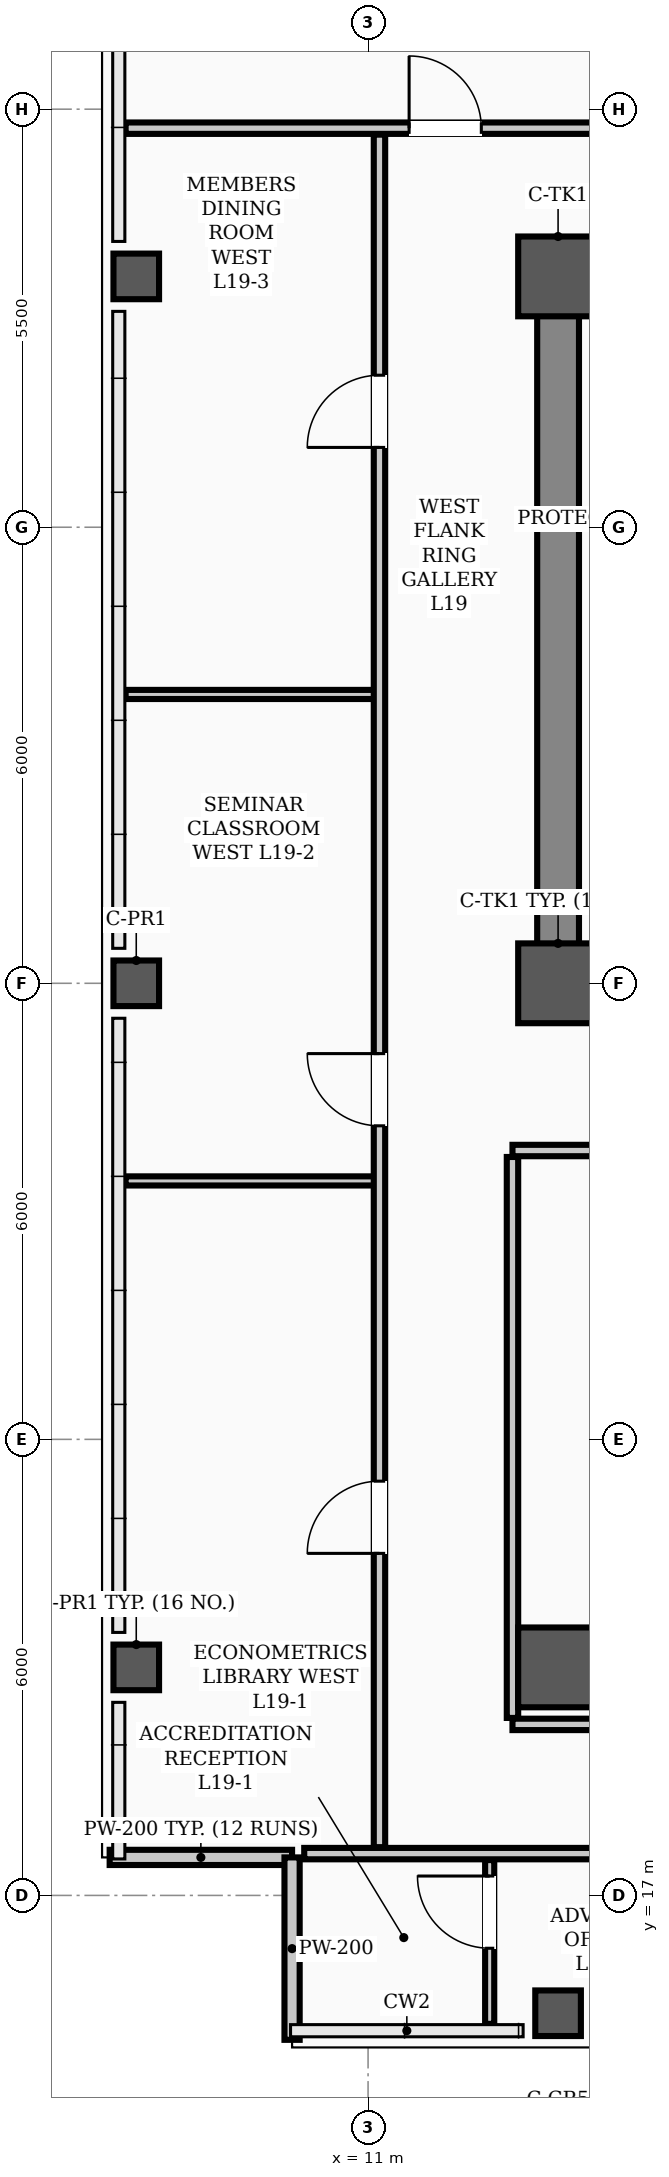
"""IFC4 building model, lengths in metres.
Left out: names, types, materials, properties, quantities, classifications, styles, units other than length and angle.
Written with IfcOpenShell. Run it as: python <this file> out.ifc"""

import sys

from ifc_helpers import new_model, si_unit, direction, frame, frame_2d, origin, origin_2d, place, context, subcontext, project, spatial, rectangle, hollow_rectangle, extrude, element, fill, save


model = new_model("IFC4")
c1 = context("Model", 3, precision=1e-05, world=origin(), true_north=direction((0.0, 1.0)))
c2 = subcontext(c1, "Body", "Model", "MODEL_VIEW")
j1 = project(units=[si_unit("LENGTHUNIT", "METRE"), si_unit("PLANEANGLEUNIT", "RADIAN")], contexts=[c1])
p1 = place(None, origin())
s1 = spatial("IfcSite", under=j1, at=p1, CompositionType="ELEMENT")
p2 = place(p1, origin())
s2 = spatial("IfcBuilding", under=s1, at=p2, CompositionType="ELEMENT")
p3 = place(p2, frame((0.0, 0.0, 77.2)))
s3 = spatial("IfcBuildingStorey", under=s2, at=p3, CompositionType="ELEMENT", Elevation=77.2)
for number, where, z_axis, x_axis in (
    (1, (13.5, 29.0, 0.0), (0.0, 0.0, 1.0), (1.0, 0.0, 0.0)),
    (2, (13.5, 38.3, 0.0), (0.0, 0.0, 1.0), (1.0, 0.0, 0.0)),
    (3, (13.5, 20.0, 0.0), (0.0, 0.0, 1.0), (1.0, 0.0, 0.0)),
):
    element("IfcColumn", number, at=place(p3, frame(where, z_axis=z_axis, x_axis=x_axis)), inside=s3, PredefinedType="COLUMN", context=c2, shape_type="SweptSolid", body=[
        extrude(hollow_rectangle(XDim=1.05, YDim=1.05, WallThickness=0.038, InnerFilletRadius=0.019, OuterFilletRadius=0.057, at=origin_2d()), origin(), (0.0, 0.0, 1.0), 3.9),
    ])
for number, where, z_axis, x_axis in (
    (4, (7.95, 20.0, 0.0), (0.0, 0.0, 1.0), (1.0, 0.0, 0.0)),
    (5, (7.95, 29.0, 0.0), (0.0, 0.0, 1.0), (1.0, 0.0, 0.0)),
    (6, (7.95, 38.3, 0.0), (0.0, 0.0, 1.0), (1.0, 0.0, 0.0)),
    (7, (13.5, 15.45, 0.0), (0.0, 0.0, 1.0), (1.0, 0.0, 0.0)),
):
    element("IfcColumn", number, at=place(p3, frame(where, z_axis=z_axis, x_axis=x_axis)), inside=s3, PredefinedType="COLUMN", context=c2, shape_type="SweptSolid", body=[
        extrude(hollow_rectangle(XDim=0.6, YDim=0.6, WallThickness=0.026, InnerFilletRadius=0.013, OuterFilletRadius=0.039, at=origin_2d()), origin(), (0.0, 0.0, 1.0), 3.9),
    ])
for number, where, z_axis, x_axis in (
    (8, (7.6, 17.5, 0.0), (0.0, 0.0, 1.0), (1.0, 0.0, 0.0)),
    (9, (10.0, 17.5, 0.0), (0.0, 0.0, 1.0), (0.0, -1.0, 0.0)),
):
    element("IfcWall", number, at=place(p3, frame(where, z_axis=z_axis, x_axis=x_axis)), inside=s3, PredefinedType="PARAPET", context=c2, shape_type="SweptSolid", body=[
        extrude(rectangle(XDim=2.4, YDim=0.2, at=frame_2d((1.2, 0.0))), origin(), (0.0, 0.0, 1.0), 1.2),
    ])
p4 = place(p3, frame((13.5, 29.0, 0.0), z_axis=(0.0, 0.0, 1.0), x_axis=(1.0, 0.0, 0.0)))
e10 = element("IfcWall", 10, at=p4, inside=s3, PredefinedType="SHEAR", context=c2, shape_type="SweptSolid", body=[
    extrude(rectangle(XDim=30.5, YDim=0.55, at=frame_2d((15.25, 0.0))), origin(), (0.0, 0.0, 1.0), 3.66),
])
p5 = place(p4, frame((1.75, 0.0, 0.0)))
e11 = element("IfcOpeningElement", 11, at=p5, cuts=e10, PredefinedType="OPENING", context=c2, shape_type="SweptSolid", body=[
    extrude(rectangle(XDim=1.1, YDim=2.08, at=frame_2d((0.55, 1.04))), frame((0.0, 0.285, 0.0), z_axis=(0.0, -1.0, 0.0), x_axis=(1.0, 0.0, 0.0)), (0.0, 0.0, 1.0), 0.57),
])
p6 = place(p4, frame((26.7, 0.0, 0.0)))
e12 = element("IfcOpeningElement", 12, at=p6, cuts=e10, PredefinedType="OPENING", context=c2, shape_type="SweptSolid", body=[
    extrude(rectangle(XDim=1.1, YDim=2.08, at=frame_2d((0.55, 1.04))), frame((0.0, 0.285, 0.0), z_axis=(0.0, -1.0, 0.0), x_axis=(1.0, 0.0, 0.0)), (0.0, 0.0, 1.0), 0.57),
])
p7 = place(p4, frame((6.8, 0.0, 0.0)))
e13 = element("IfcOpeningElement", 13, at=p7, cuts=e10, PredefinedType="OPENING", context=c2, shape_type="SweptSolid", body=[
    extrude(rectangle(XDim=1.1, YDim=2.08, at=frame_2d((0.55, 1.04))), frame((0.0, 0.285, 0.0), z_axis=(0.0, -1.0, 0.0), x_axis=(1.0, 0.0, 0.0)), (0.0, 0.0, 1.0), 0.57),
])
p8 = place(p4, frame((13.2, 0.0, 0.0)))
e14 = element("IfcOpeningElement", 14, at=p8, cuts=e10, PredefinedType="OPENING", context=c2, shape_type="SweptSolid", body=[
    extrude(rectangle(XDim=1.6, YDim=2.08, at=frame_2d((0.8, 1.04))), frame((0.0, 0.285, 0.0), z_axis=(0.0, -1.0, 0.0), x_axis=(1.0, 0.0, 0.0)), (0.0, 0.0, 1.0), 0.57),
])
p9 = place(p4, frame((19.6, 0.0, 0.0)))
e15 = element("IfcOpeningElement", 15, at=p9, cuts=e10, PredefinedType="OPENING", context=c2, shape_type="SweptSolid", body=[
    extrude(rectangle(XDim=0.9, YDim=2.08, at=frame_2d((0.45, 1.04))), frame((0.0, 0.285, 0.0), z_axis=(0.0, -1.0, 0.0), x_axis=(1.0, 0.0, 0.0)), (0.0, 0.0, 1.0), 0.57),
])
p10 = place(p4, frame((21.6, 0.0, 0.0)))
e16 = element("IfcOpeningElement", 16, at=p10, cuts=e10, PredefinedType="OPENING", context=c2, shape_type="SweptSolid", body=[
    extrude(rectangle(XDim=0.9, YDim=2.08, at=frame_2d((0.45, 1.04))), frame((0.0, 0.285, 0.0), z_axis=(0.0, -1.0, 0.0), x_axis=(1.0, 0.0, 0.0)), (0.0, 0.0, 1.0), 0.57),
])
p11 = place(p3, frame((13.5, 38.3, 0.0), z_axis=(0.0, 0.0, 1.0), x_axis=(1.0, 0.0, 0.0)))
e17 = element("IfcWall", 17, at=p11, inside=s3, PredefinedType="SHEAR", context=c2, shape_type="SweptSolid", body=[
    extrude(rectangle(XDim=30.5, YDim=0.55, at=frame_2d((15.25, 0.0))), origin(), (0.0, 0.0, 1.0), 3.66),
])
p12 = place(p3, frame((13.5, 29.35, 0.0), z_axis=(0.0, 0.0, 1.0), x_axis=(0.0, 1.0, 0.0)))
e18 = element("IfcWall", 18, at=p12, inside=s3, PredefinedType="SHEAR", context=c2, shape_type="SweptSolid", body=[
    extrude(rectangle(XDim=8.6, YDim=0.55, at=frame_2d((4.3, 0.0))), origin(), (0.0, 0.0, 1.0), 3.66),
])
p13 = place(p3, frame((12.9, 26.8, 0.0), z_axis=(0.0, 0.0, 1.0), x_axis=(1.0, 0.0, 0.0)))
e19 = element("IfcWall", 19, at=p13, inside=s3, PredefinedType="PARTITIONING", context=c2, shape_type="SweptSolid", body=[
    extrude(rectangle(XDim=31.7, YDim=0.15, at=frame_2d((15.85, 0.0))), origin(), (0.0, 0.0, 1.0), 2.24),
])
p14 = place(p13, frame((13.6, 0.0, 0.0)))
e20 = element("IfcOpeningElement", 20, at=p14, cuts=e19, PredefinedType="OPENING", context=c2, shape_type="SweptSolid", body=[
    extrude(rectangle(XDim=1.6, YDim=2.08, at=frame_2d((0.8, 1.04))), frame((0.0, 0.085, 0.0), z_axis=(0.0, -1.0, 0.0), x_axis=(1.0, 0.0, 0.0)), (0.0, 0.0, 1.0), 0.17),
])
p15 = place(p13, frame((1.875, 0.0, 0.0)))
e21 = element("IfcOpeningElement", 21, at=p15, cuts=e19, PredefinedType="OPENING", context=c2, shape_type="SweptSolid", body=[
    extrude(rectangle(XDim=0.95, YDim=2.08, at=frame_2d((0.475, 1.04))), frame((0.0, 0.085, 0.0), z_axis=(0.0, -1.0, 0.0), x_axis=(1.0, 0.0, 0.0)), (0.0, 0.0, 1.0), 0.17),
])
p16 = place(p13, frame((6.425, 0.0, 0.0)))
e22 = element("IfcOpeningElement", 22, at=p16, cuts=e19, PredefinedType="OPENING", context=c2, shape_type="SweptSolid", body=[
    extrude(rectangle(XDim=0.95, YDim=2.08, at=frame_2d((0.475, 1.04))), frame((0.0, 0.085, 0.0), z_axis=(0.0, -1.0, 0.0), x_axis=(1.0, 0.0, 0.0)), (0.0, 0.0, 1.0), 0.17),
])
p17 = place(p13, frame((10.725, 0.0, 0.0)))
e23 = element("IfcOpeningElement", 23, at=p17, cuts=e19, PredefinedType="OPENING", context=c2, shape_type="SweptSolid", body=[
    extrude(rectangle(XDim=0.95, YDim=2.08, at=frame_2d((0.475, 1.04))), frame((0.0, 0.085, 0.0), z_axis=(0.0, -1.0, 0.0), x_axis=(1.0, 0.0, 0.0)), (0.0, 0.0, 1.0), 0.17),
])
p18 = place(p13, frame((16.075, 0.0, 0.0)))
e24 = element("IfcOpeningElement", 24, at=p18, cuts=e19, PredefinedType="OPENING", context=c2, shape_type="SweptSolid", body=[
    extrude(rectangle(XDim=0.95, YDim=2.08, at=frame_2d((0.475, 1.04))), frame((0.0, 0.085, 0.0), z_axis=(0.0, -1.0, 0.0), x_axis=(1.0, 0.0, 0.0)), (0.0, 0.0, 1.0), 0.17),
])
p19 = place(p13, frame((22.225, 0.0, 0.0)))
e25 = element("IfcOpeningElement", 25, at=p19, cuts=e19, PredefinedType="OPENING", context=c2, shape_type="SweptSolid", body=[
    extrude(rectangle(XDim=0.95, YDim=2.08, at=frame_2d((0.475, 1.04))), frame((0.0, 0.085, 0.0), z_axis=(0.0, -1.0, 0.0), x_axis=(1.0, 0.0, 0.0)), (0.0, 0.0, 1.0), 0.17),
])
p20 = place(p13, frame((28.225, 0.0, 0.0)))
e26 = element("IfcOpeningElement", 26, at=p20, cuts=e19, PredefinedType="OPENING", context=c2, shape_type="SweptSolid", body=[
    extrude(rectangle(XDim=0.95, YDim=2.08, at=frame_2d((0.475, 1.04))), frame((0.0, 0.085, 0.0), z_axis=(0.0, -1.0, 0.0), x_axis=(1.0, 0.0, 0.0)), (0.0, 0.0, 1.0), 0.17),
])
p21 = place(p3, frame((10.16, 17.55, 0.0), z_axis=(0.0, 0.0, 1.0), x_axis=(1.0, 0.0, 0.0)))
e27 = element("IfcWall", 27, at=p21, inside=s3, PredefinedType="PARTITIONING", context=c2, shape_type="SweptSolid", body=[
    extrude(rectangle(XDim=44.68, YDim=0.15, at=frame_2d((22.34, 0.0))), origin(), (0.0, 0.0, 1.0), 2.24),
])
p22 = place(p21, frame((5.465, 0.0, 0.0)))
e28 = element("IfcOpeningElement", 28, at=p22, cuts=e27, PredefinedType="OPENING", context=c2, shape_type="SweptSolid", body=[
    extrude(rectangle(XDim=0.95, YDim=2.08, at=frame_2d((0.475, 1.04))), frame((0.0, 0.085, 0.0), z_axis=(0.0, -1.0, 0.0), x_axis=(1.0, 0.0, 0.0)), (0.0, 0.0, 1.0), 0.17),
])
p23 = place(p21, frame((11.465, 0.0, 0.0)))
e29 = element("IfcOpeningElement", 29, at=p23, cuts=e27, PredefinedType="OPENING", context=c2, shape_type="SweptSolid", body=[
    extrude(rectangle(XDim=0.95, YDim=2.08, at=frame_2d((0.475, 1.04))), frame((0.0, 0.085, 0.0), z_axis=(0.0, -1.0, 0.0), x_axis=(1.0, 0.0, 0.0)), (0.0, 0.0, 1.0), 0.17),
])
p24 = place(p21, frame((28.565, 0.0, 0.0)))
e30 = element("IfcOpeningElement", 30, at=p24, cuts=e27, PredefinedType="OPENING", context=c2, shape_type="SweptSolid", body=[
    extrude(rectangle(XDim=0.95, YDim=2.08, at=frame_2d((0.475, 1.04))), frame((0.0, 0.085, 0.0), z_axis=(0.0, -1.0, 0.0), x_axis=(1.0, 0.0, 0.0)), (0.0, 0.0, 1.0), 0.17),
])
p25 = place(p21, frame((34.14, 0.0, 0.0)))
e31 = element("IfcOpeningElement", 31, at=p25, cuts=e27, PredefinedType="OPENING", context=c2, shape_type="SweptSolid", body=[
    extrude(rectangle(XDim=0.95, YDim=2.08, at=frame_2d((0.475, 1.04))), frame((0.0, 0.085, 0.0), z_axis=(0.0, -1.0, 0.0), x_axis=(1.0, 0.0, 0.0)), (0.0, 0.0, 1.0), 0.17),
])
p26 = place(p3, frame((12.9, 19.25, 0.0), z_axis=(0.0, 0.0, 1.0), x_axis=(1.0, 0.0, 0.0)))
e32 = element("IfcWall", 32, at=p26, inside=s3, PredefinedType="PARTITIONING", context=c2, shape_type="SweptSolid", body=[
    extrude(rectangle(XDim=13.3, YDim=0.15, at=frame_2d((6.65, 0.0))), origin(), (0.0, 0.0, 1.0), 2.24),
])
for number, where, z_axis, x_axis in (
    (33, (7.81, 26.4, 0.0), (0.0, 0.0, 1.0), (1.0, 0.0, 0.0)),
    (34, (7.81, 32.8, 0.0), (0.0, 0.0, 1.0), (1.0, 0.0, 0.0)),
):
    element("IfcWall", number, at=place(p3, frame(where, z_axis=z_axis, x_axis=x_axis)), inside=s3, PredefinedType="PARTITIONING", context=c2, shape_type="SweptSolid", body=[
        extrude(rectangle(XDim=3.34, YDim=0.12, at=frame_2d((1.67, 0.0))), origin(), (0.0, 0.0, 1.0), 2.24),
    ])
p27 = place(p3, frame((7.81, 40.25, 0.0), z_axis=(0.0, 0.0, 1.0), x_axis=(1.0, 0.0, 0.0)))
e35 = element("IfcWall", 35, at=p27, inside=s3, PredefinedType="PARTITIONING", context=c2, shape_type="SweptSolid", body=[
    extrude(rectangle(XDim=49.38, YDim=0.15, at=frame_2d((24.69, 0.0))), origin(), (0.0, 0.0, 1.0), 2.24),
])
p28 = place(p27, frame((3.73, 0.0, 0.0)))
e36 = element("IfcOpeningElement", 36, at=p28, cuts=e35, PredefinedType="OPENING", context=c2, shape_type="SweptSolid", body=[
    extrude(rectangle(XDim=0.95, YDim=2.08, at=frame_2d((0.475, 1.04))), frame((0.0, 0.085, 0.0), z_axis=(0.0, -1.0, 0.0), x_axis=(1.0, 0.0, 0.0)), (0.0, 0.0, 1.0), 0.17),
])
p29 = place(p27, frame((18.115, 0.0, 0.0)))
e37 = element("IfcOpeningElement", 37, at=p29, cuts=e35, PredefinedType="OPENING", context=c2, shape_type="SweptSolid", body=[
    extrude(rectangle(XDim=0.95, YDim=2.08, at=frame_2d((0.475, 1.04))), frame((0.0, 0.085, 0.0), z_axis=(0.0, -1.0, 0.0), x_axis=(1.0, 0.0, 0.0)), (0.0, 0.0, 1.0), 0.17),
])
p30 = place(p27, frame((27.415, 0.0, 0.0)))
e38 = element("IfcOpeningElement", 38, at=p30, cuts=e35, PredefinedType="OPENING", context=c2, shape_type="SweptSolid", body=[
    extrude(rectangle(XDim=0.95, YDim=2.08, at=frame_2d((0.475, 1.04))), frame((0.0, 0.085, 0.0), z_axis=(0.0, -1.0, 0.0), x_axis=(1.0, 0.0, 0.0)), (0.0, 0.0, 1.0), 0.17),
])
p31 = place(p27, frame((37.2, 0.0, 0.0)))
e39 = element("IfcOpeningElement", 39, at=p31, cuts=e35, PredefinedType="OPENING", context=c2, shape_type="SweptSolid", body=[
    extrude(rectangle(XDim=0.95, YDim=2.08, at=frame_2d((0.475, 1.04))), frame((0.0, 0.085, 0.0), z_axis=(0.0, -1.0, 0.0), x_axis=(1.0, 0.0, 0.0)), (0.0, 0.0, 1.0), 0.17),
])
p32 = place(p3, frame((11.15, 17.635, 0.0), z_axis=(0.0, 0.0, 1.0), x_axis=(0.0, 1.0, 0.0)))
e40 = element("IfcWall", 40, at=p32, inside=s3, PredefinedType="PARTITIONING", context=c2, shape_type="SweptSolid", body=[
    extrude(rectangle(XDim=22.53, YDim=0.15, at=frame_2d((11.265, 0.0))), origin(), (0.0, 0.0, 1.0), 2.24),
])
p33 = place(p32, frame((3.865, 0.0, 0.0)))
e41 = element("IfcOpeningElement", 41, at=p33, cuts=e40, PredefinedType="OPENING", context=c2, shape_type="SweptSolid", body=[
    extrude(rectangle(XDim=0.95, YDim=2.08, at=frame_2d((0.475, 1.04))), frame((0.0, 0.085, 0.0), z_axis=(0.0, -1.0, 0.0), x_axis=(1.0, 0.0, 0.0)), (0.0, 0.0, 1.0), 0.17),
])
p34 = place(p32, frame((9.49, 0.0, 0.0)))
e42 = element("IfcOpeningElement", 42, at=p34, cuts=e40, PredefinedType="OPENING", context=c2, shape_type="SweptSolid", body=[
    extrude(rectangle(XDim=0.95, YDim=2.08, at=frame_2d((0.475, 1.04))), frame((0.0, 0.085, 0.0), z_axis=(0.0, -1.0, 0.0), x_axis=(1.0, 0.0, 0.0)), (0.0, 0.0, 1.0), 0.17),
])
p35 = place(p32, frame((18.415, 0.0, 0.0)))
e43 = element("IfcOpeningElement", 43, at=p35, cuts=e40, PredefinedType="OPENING", context=c2, shape_type="SweptSolid", body=[
    extrude(rectangle(XDim=0.95, YDim=2.08, at=frame_2d((0.475, 1.04))), frame((0.0, 0.085, 0.0), z_axis=(0.0, -1.0, 0.0), x_axis=(1.0, 0.0, 0.0)), (0.0, 0.0, 1.0), 0.17),
])
p36 = place(p3, frame((12.9, 19.335, 0.0), z_axis=(0.0, 0.0, 1.0), x_axis=(0.0, 1.0, 0.0)))
e44 = element("IfcWall", 44, at=p36, inside=s3, PredefinedType="PARTITIONING", context=c2, shape_type="SweptSolid", body=[
    extrude(rectangle(XDim=7.38, YDim=0.15, at=frame_2d((3.69, 0.0))), origin(), (0.0, 0.0, 1.0), 2.24),
])
p37 = place(p3, frame((12.6, 15.31, 0.0), z_axis=(0.0, 0.0, 1.0), x_axis=(0.0, 1.0, 0.0)))
e45 = element("IfcWall", 45, at=p37, inside=s3, PredefinedType="PARTITIONING", context=c2, shape_type="SweptSolid", body=[
    extrude(rectangle(XDim=2.155, YDim=0.12, at=frame_2d((1.078, 0.0))), origin(), (0.0, 0.0, 1.0), 3.66),
])
p38 = place(p37, frame((0.995, 0.0, 0.0)))
e46 = element("IfcOpeningElement", 46, at=p38, cuts=e45, PredefinedType="OPENING", context=c2, shape_type="SweptSolid", body=[
    extrude(rectangle(XDim=0.95, YDim=2.08, at=frame_2d((0.475, 1.04))), frame((0.0, 0.07, 0.0), z_axis=(0.0, -1.0, 0.0), x_axis=(1.0, 0.0, 0.0)), (0.0, 0.0, 1.0), 0.14),
])
p39 = place(p38, origin())
e47 = element("IfcDoor", 47, at=p39, inside=s3, OperationType="SINGLE_SWING_RIGHT", PredefinedType="DOOR", context=c2, shape_type="SweptSolid", body=[
    extrude(rectangle(XDim=0.95, YDim=2.08, at=frame_2d((0.475, 1.04))), frame((0.0, 0.025, 0.0), z_axis=(0.0, -1.0, 0.0), x_axis=(1.0, 0.0, 0.0)), (0.0, 0.0, 1.0), 0.05),
])
fill(e46, e47)
p40 = place(p33, origin())
e48 = element("IfcDoor", 48, at=p40, inside=s3, OperationType="SINGLE_SWING_LEFT", PredefinedType="DOOR", context=c2, shape_type="SweptSolid", body=[
    extrude(rectangle(XDim=0.95, YDim=2.08, at=frame_2d((0.475, 1.04))), frame((0.0, 0.025, 0.0), z_axis=(0.0, -1.0, 0.0), x_axis=(1.0, 0.0, 0.0)), (0.0, 0.0, 1.0), 0.05),
])
fill(e41, e48)
p41 = place(p34, origin())
e49 = element("IfcDoor", 49, at=p41, inside=s3, OperationType="SINGLE_SWING_RIGHT", PredefinedType="DOOR", context=c2, shape_type="SweptSolid", body=[
    extrude(rectangle(XDim=0.95, YDim=2.08, at=frame_2d((0.475, 1.04))), frame((0.0, 0.025, 0.0), z_axis=(0.0, -1.0, 0.0), x_axis=(1.0, 0.0, 0.0)), (0.0, 0.0, 1.0), 0.05),
])
fill(e42, e49)
p42 = place(p35, origin())
e50 = element("IfcDoor", 50, at=p42, inside=s3, OperationType="SINGLE_SWING_LEFT", PredefinedType="DOOR", context=c2, shape_type="SweptSolid", body=[
    extrude(rectangle(XDim=0.95, YDim=2.08, at=frame_2d((0.475, 1.04))), frame((0.0, 0.025, 0.0), z_axis=(0.0, -1.0, 0.0), x_axis=(1.0, 0.0, 0.0)), (0.0, 0.0, 1.0), 0.05),
])
fill(e43, e50)
p43 = place(p28, origin())
e51 = element("IfcDoor", 51, at=p43, inside=s3, OperationType="SINGLE_SWING_LEFT", PredefinedType="DOOR", context=c2, shape_type="SweptSolid", body=[
    extrude(rectangle(XDim=0.95, YDim=2.08, at=frame_2d((0.475, 1.04))), frame((0.0, 0.025, 0.0), z_axis=(0.0, -1.0, 0.0), x_axis=(1.0, 0.0, 0.0)), (0.0, 0.0, 1.0), 0.05),
])
fill(e36, e51)
save(model, sys.argv[1])
